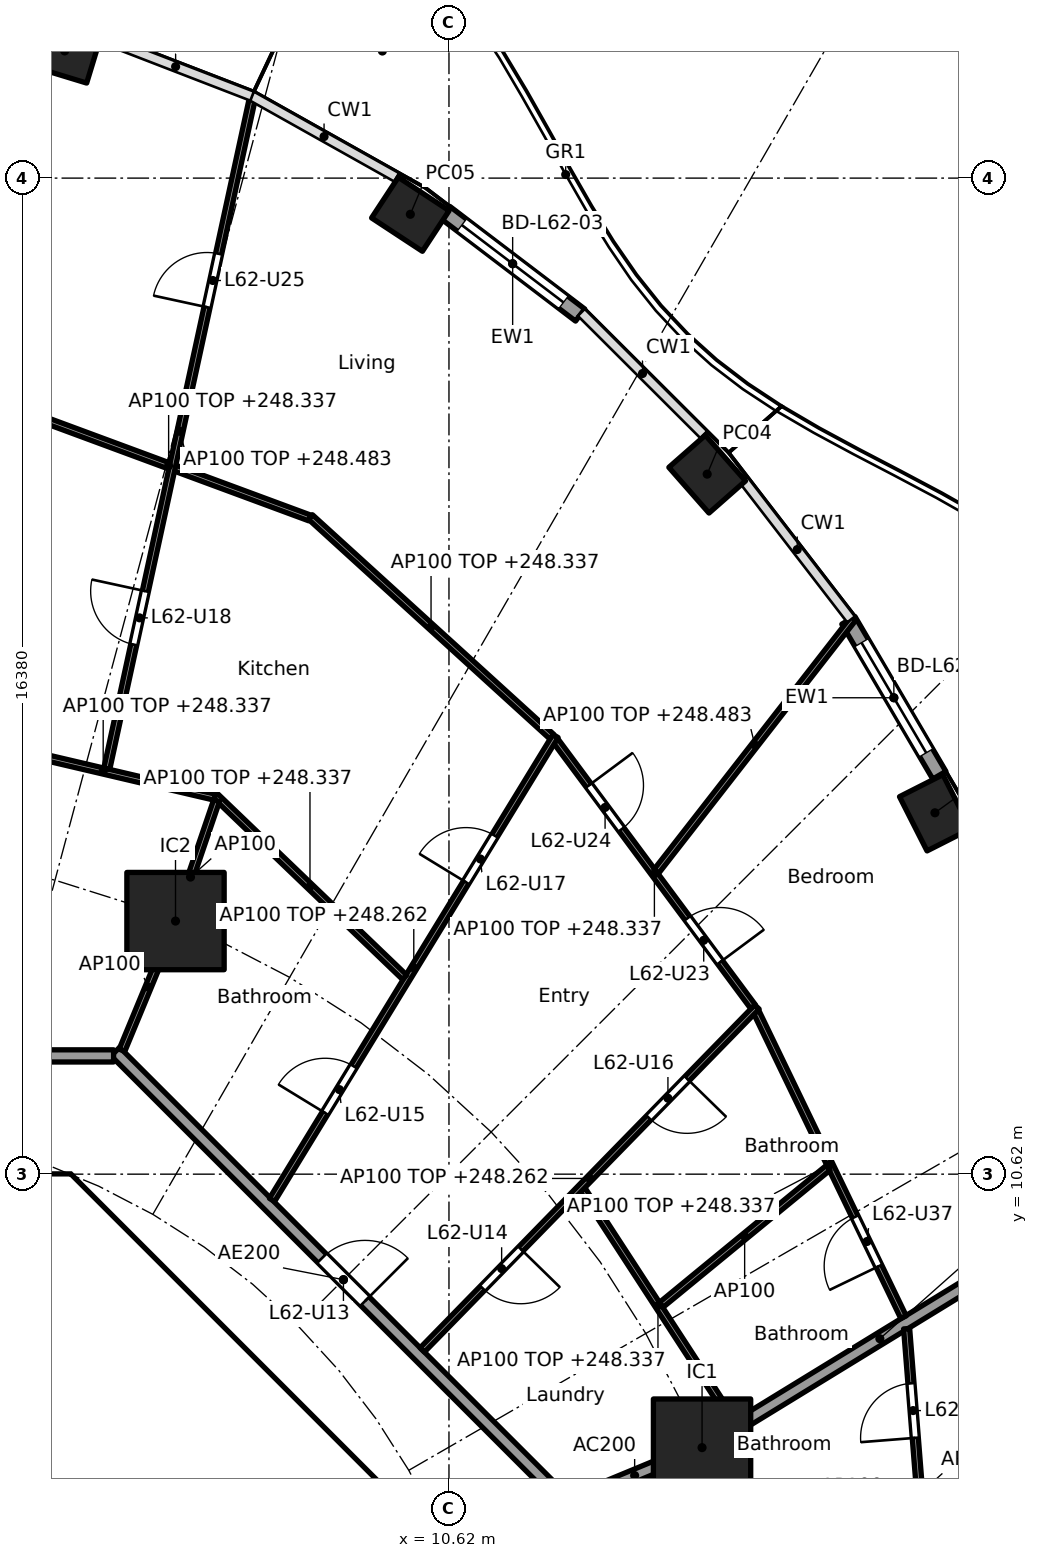
"""IFC4 building model, lengths in metres.
Left out: names, types, materials, properties, quantities, classifications, styles, units other than length and angle.
Written with IfcOpenShell. Run it as: python <this file> out.ifc"""

import sys

from ifc_helpers import new_model, si_unit, direction, frame, frame_2d, origin, origin_2d, place, context, subcontext, project, spatial, polyline, rectangle, hollow_rectangle, outline, extrude, element, fill, save


model = new_model("IFC4")
c1 = context("Model", 3, precision=1e-05, world=origin(), true_north=direction((0.0, 1.0)))
c2 = subcontext(c1, "Body", "Model", "MODEL_VIEW")
j1 = project(units=[si_unit("LENGTHUNIT", "METRE"), si_unit("PLANEANGLEUNIT", "RADIAN")], contexts=[c1])
p1 = place(None, origin())
s1 = spatial("IfcSite", under=j1, at=p1, CompositionType="ELEMENT")
p2 = place(p1, origin())
s2 = spatial("IfcBuilding", under=s1, at=p2, CompositionType="ELEMENT")
p3 = place(p2, frame((0.0, 0.0, 245.5)))
s3 = spatial("IfcBuildingStorey", under=s2, at=p3, CompositionType="ELEMENT", Elevation=245.5)
for number, where, z_axis, x_axis in (
    (1, (18.612, 16.563, 0.0), (0.0, 0.0, 1.0), (-0.452, 0.892, 0.0)),
    (2, (14.866, 22.132, 0.0), (0.0, 0.0, 1.0), (-0.66, 0.751, 0.0)),
    (3, (9.985, 26.405, 0.0), (0.0, 0.0, 1.0), (-0.836, 0.549, 0.0)),
    (4, (4.3, 29.092, 0.0), (0.0, 0.0, 1.0), (-0.957, 0.292, 0.0)),
):
    element("IfcColumn", number, at=place(p3, frame(where, z_axis=z_axis, x_axis=x_axis)), inside=s3, PredefinedType="COLUMN", context=c2, shape_type="SweptSolid", body=[
        extrude(hollow_rectangle(XDim=1.0, YDim=0.8, WallThickness=0.032, at=origin_2d()), origin(), (0.0, 0.0, 1.0), 3.7),
    ])
for number, where, z_axis, x_axis in (
    (5, (14.782, 6.123, 0.0), (0.0, 0.0, 1.0), (1.0, 0.0, 0.0)),
    (6, (6.123, 14.782, 0.0), (0.0, 0.0, 1.0), (1.0, 0.0, 0.0)),
):
    element("IfcColumn", number, at=place(p3, frame(where, z_axis=z_axis, x_axis=x_axis)), inside=s3, PredefinedType="COLUMN", context=c2, shape_type="SweptSolid", body=[
        extrude(rectangle(XDim=1.6, YDim=1.6, at=origin_2d()), origin(), (0.0, 0.0, 1.0), 3.7),
    ])
p4 = place(p3, frame((17.188, 19.728, 0.0), z_axis=(0.0, 0.0, 1.0), x_axis=(0.506391620556, -0.862303616269, 0.0)))
e7 = element("IfcWall", 7, at=p4, inside=s3, PredefinedType="SOLIDWALL", context=c2, shape_type="SweptSolid", body=[
    extrude(rectangle(XDim=2.954, YDim=0.25, at=frame_2d((1.477, 0.0))), origin(), (0.0, 0.0, 1.0), 3.44),
])
p5 = place(p4, frame((0.427, 0.0, 0.0)))
e8 = element("IfcOpeningElement", 8, at=p5, cuts=e7, PredefinedType="OPENING", context=c2, shape_type="SweptSolid", body=[
    extrude(rectangle(XDim=2.1, YDim=2.4, at=frame_2d((1.05, 1.2))), frame((0.0, 0.135, 0.0), z_axis=(0.0, -1.0, 0.0), x_axis=(1.0, 0.0, 0.0)), (0.0, 0.0, 1.0), 0.27),
])
p6 = place(p3, frame((10.557, 26.436, 0.0), z_axis=(0.0, 0.0, 1.0), x_axis=(0.796022158395, -0.605267480825, 0.0)))
e9 = element("IfcWall", 9, at=p6, inside=s3, PredefinedType="SOLIDWALL", context=c2, shape_type="SweptSolid", body=[
    extrude(rectangle(XDim=2.789, YDim=0.25, at=frame_2d((1.395, 0.0))), origin(), (0.0, 0.0, 1.0), 3.44),
])
p7 = place(p6, frame((0.344, 0.0, 0.0)))
e10 = element("IfcOpeningElement", 10, at=p7, cuts=e9, PredefinedType="OPENING", context=c2, shape_type="SweptSolid", body=[
    extrude(rectangle(XDim=2.1, YDim=2.4, at=frame_2d((1.05, 1.2))), frame((0.0, 0.135, 0.0), z_axis=(0.0, -1.0, 0.0), x_axis=(1.0, 0.0, 0.0)), (0.0, 0.0, 1.0), 0.27),
])
p8 = place(p3, frame((9.988, 4.613, 0.0), z_axis=(0.0, 0.0, 1.0), x_axis=(-0.707106781187, 0.707106781187, 0.0)))
e11 = element("IfcWall", 11, at=p8, inside=s3, PredefinedType="SHEAR", context=c2, shape_type="SweptSolid", body=[
    extrude(rectangle(XDim=7.602, YDim=0.6, at=frame_2d((3.801, 0.0))), origin(), (0.0, 0.0, 1.0), 3.44),
])
p9 = place(p8, frame((3.201, 0.0, 0.0)))
e12 = element("IfcOpeningElement", 12, at=p9, cuts=e11, PredefinedType="OPENING", context=c2, shape_type="SweptSolid", body=[
    extrude(rectangle(XDim=1.2, YDim=2.1, at=frame_2d((0.6, 1.05))), frame((0.0, 0.31, 0.0), z_axis=(0.0, -1.0, 0.0), x_axis=(1.0, 0.0, 0.0)), (0.0, 0.0, 1.0), 0.62),
])
p10 = place(p3, origin())
e13 = element("IfcWall", 13, at=p10, inside=s3, PredefinedType="SHEAR", context=c2, shape_type="SweptSolid", body=[
    extrude(outline(polyline([(-4.152, 10.025), (-4.401, 9.776), (-4.825, 10.2), (-4.401, 10.625), (4.401, 10.625), (4.825, 10.2), (4.401, 9.776), (4.152, 10.025), (-4.152, 10.025)])), origin(), (0.0, 0.0, 1.0), 3.44),
])
p11 = place(p3, frame((12.657, 5.243, 0.0), z_axis=(0.0, 0.0, 1.0), x_axis=(0.92383017907, 0.382802560388, 0.0)))
e14 = element("IfcWall", 14, at=p11, inside=s3, PredefinedType="PARTITIONING", context=c2, shape_type="SweptSolid", body=[
    extrude(rectangle(XDim=2.2, YDim=0.2, at=frame_2d((1.1, 0.0))), origin(), (0.0, 0.0, 1.0), 3.44),
])
p12 = place(p3, frame((14.825, 6.149, 0.0), z_axis=(0.0, 0.0, 1.0), x_axis=(0.852781365284, 0.522268075824, 0.0)))
e15 = element("IfcWall", 15, at=p12, inside=s3, PredefinedType="PARTITIONING", context=c2, shape_type="SweptSolid", body=[
    extrude(rectangle(XDim=6.758, YDim=0.2, at=frame_2d((3.379, 0.0))), origin(), (0.0, 0.0, 1.0), 2.837),
])
p13 = place(p3, frame((12.635, 5.134, 0.0), z_axis=(0.0, 0.0, 1.0), x_axis=(-0.707106781187, 0.707106781187, 0.0)))
e16 = element("IfcWall", 16, at=p13, inside=s3, PredefinedType="PARTITIONING", context=c2, shape_type="SweptSolid", body=[
    extrude(rectangle(XDim=10.609, YDim=0.2, at=frame_2d((5.305, 0.0))), origin(), (0.0, 0.0, 1.0), 3.44),
])
p14 = place(p13, frame((4.804, 0.0, 0.0)))
e17 = element("IfcOpeningElement", 17, at=p14, cuts=e16, PredefinedType="OPENING", context=c2, shape_type="SweptSolid", body=[
    extrude(rectangle(XDim=1.0, YDim=2.1, at=frame_2d((0.5, 1.05))), frame((0.0, 0.11, 0.0), z_axis=(0.0, -1.0, 0.0), x_axis=(1.0, 0.0, 0.0)), (0.0, 0.0, 1.0), 0.22),
])
p15 = place(p3, frame((5.104, 12.565, 0.0), z_axis=(0.0, 0.0, 1.0), x_axis=(-1.0, 0.0, 0.0)))
e18 = element("IfcWall", 18, at=p15, inside=s3, PredefinedType="PARTITIONING", context=c2, shape_type="SweptSolid", body=[
    extrude(rectangle(XDim=10.409, YDim=0.2, at=frame_2d((5.205, 0.0))), origin(), (0.0, 0.0, 1.0), 3.44),
])
p16 = place(p3, frame((15.475, 2.2, 0.0), z_axis=(0.0, 0.0, 1.0), x_axis=(-0.029254623973, 0.999571991893, 0.0)))
e19 = element("IfcWall", 19, at=p16, inside=s3, PredefinedType="PARTITIONING", context=c2, shape_type="SweptSolid", body=[
    extrude(rectangle(XDim=4.173, YDim=0.1, at=frame_2d((2.086, 0.0))), origin(), (0.0, 0.0, 1.0), 2.837),
])
p17 = place(p3, frame((18.578, 2.642, 0.0), z_axis=(0.0, 0.0, 1.0), x_axis=(-0.079188322924, 0.996859673932, 0.0)))
e20 = element("IfcWall", 20, at=p17, inside=s3, PredefinedType="PARTITIONING", context=c2, shape_type="SweptSolid", body=[
    extrude(rectangle(XDim=5.454, YDim=0.1, at=frame_2d((2.727, 0.0))), origin(), (0.0, 0.0, 1.0), 2.837),
])
p18 = place(p17, frame((3.653, 0.0, 0.0)))
e21 = element("IfcOpeningElement", 21, at=p18, cuts=e20, PredefinedType="OPENING", context=c2, shape_type="SweptSolid", body=[
    extrude(rectangle(XDim=0.9, YDim=2.1, at=frame_2d((0.45, 1.05))), frame((0.0, 0.06, 0.0), z_axis=(0.0, -1.0, 0.0), x_axis=(1.0, 0.0, 0.0)), (0.0, 0.0, 1.0), 0.12),
])
p19 = place(p3, frame((15.295, 6.554, 0.0), z_axis=(0.0, 0.0, 1.0), x_axis=(-0.545150807833, 0.838337996705, 0.0)))
e22 = element("IfcWall", 22, at=p19, inside=s3, PredefinedType="PARTITIONING", context=c2, shape_type="SweptSolid", body=[
    extrude(rectangle(XDim=4.542, YDim=0.1, at=frame_2d((2.271, 0.0))), origin(), (0.0, 0.0, 1.0), 2.837),
])
p20 = place(p3, frame((18.095, 8.269, 0.0), z_axis=(0.0, 0.0, 1.0), x_axis=(-0.434643729881, 0.900602480607, 0.0)))
e23 = element("IfcWall", 23, at=p20, inside=s3, PredefinedType="PARTITIONING", context=c2, shape_type="SweptSolid", body=[
    extrude(rectangle(XDim=5.574, YDim=0.1, at=frame_2d((2.787, 0.0))), origin(), (0.0, 0.0, 1.0), 2.837),
])
p21 = place(p20, frame((0.931, 0.0, 0.0)))
e24 = element("IfcOpeningElement", 24, at=p21, cuts=e23, PredefinedType="OPENING", context=c2, shape_type="SweptSolid", body=[
    extrude(rectangle(XDim=0.9, YDim=2.1, at=frame_2d((0.45, 1.05))), frame((0.0, 0.06, 0.0), z_axis=(0.0, -1.0, 0.0), x_axis=(1.0, 0.0, 0.0)), (0.0, 0.0, 1.0), 0.12),
])
p22 = place(p3, frame((14.109, 8.469, 0.0), z_axis=(0.0, 0.0, 1.0), x_axis=(0.772802064515, 0.634647121699, 0.0)))
e25 = element("IfcWall", 25, at=p22, inside=s3, PredefinedType="PARTITIONING", context=c2, shape_type="SweptSolid", body=[
    extrude(rectangle(XDim=3.554, YDim=0.1, at=frame_2d((1.777, 0.0))), origin(), (0.0, 0.0, 1.0), 3.44),
])
p23 = place(p3, frame((10.181, 7.729, 0.0), z_axis=(0.0, 0.0, 1.0), x_axis=(0.698426432281, 0.715681855779, 0.0)))
e26 = element("IfcWall", 26, at=p23, inside=s3, PredefinedType="PARTITIONING", context=c2, shape_type="SweptSolid", body=[
    extrude(rectangle(XDim=7.881, YDim=0.1, at=frame_2d((3.94, 0.0))), origin(), (0.0, 0.0, 1.0), 2.762),
])
p24 = place(p23, frame((1.419, 0.0, 0.0)))
e27 = element("IfcOpeningElement", 27, at=p24, cuts=e26, PredefinedType="OPENING", context=c2, shape_type="SweptSolid", body=[
    extrude(rectangle(XDim=0.9, YDim=2.1, at=frame_2d((0.45, 1.05))), frame((0.0, 0.06, 0.0), z_axis=(0.0, -1.0, 0.0), x_axis=(1.0, 0.0, 0.0)), (0.0, 0.0, 1.0), 0.12),
])
p25 = place(p23, frame((5.334, 0.0, 0.0)))
e28 = element("IfcOpeningElement", 28, at=p25, cuts=e26, PredefinedType="OPENING", context=c2, shape_type="SweptSolid", body=[
    extrude(rectangle(XDim=0.9, YDim=2.1, at=frame_2d((0.45, 1.05))), frame((0.0, 0.06, 0.0), z_axis=(0.0, -1.0, 0.0), x_axis=(1.0, 0.0, 0.0)), (0.0, 0.0, 1.0), 0.12),
])
p26 = place(p3, frame((15.621, 13.374, 0.0), z_axis=(0.0, 0.0, 1.0), x_axis=(-0.596174489482, 0.8028548923, 0.0)))
e29 = element("IfcWall", 29, at=p26, inside=s3, PredefinedType="PARTITIONING", context=c2, shape_type="SweptSolid", body=[
    extrude(rectangle(XDim=5.442, YDim=0.1, at=frame_2d((2.721, 0.0))), origin(), (0.0, 0.0, 1.0), 2.837),
])
p27 = place(p26, frame((0.91, 0.0, 0.0)))
e30 = element("IfcOpeningElement", 30, at=p27, cuts=e29, PredefinedType="OPENING", context=c2, shape_type="SweptSolid", body=[
    extrude(rectangle(XDim=0.9, YDim=2.1, at=frame_2d((0.45, 1.05))), frame((0.0, 0.06, 0.0), z_axis=(0.0, -1.0, 0.0), x_axis=(1.0, 0.0, 0.0)), (0.0, 0.0, 1.0), 0.12),
])
p28 = place(p26, frame((3.631, 0.0, 0.0)))
e31 = element("IfcOpeningElement", 31, at=p28, cuts=e29, PredefinedType="OPENING", context=c2, shape_type="SweptSolid", body=[
    extrude(rectangle(XDim=0.9, YDim=2.1, at=frame_2d((0.45, 1.05))), frame((0.0, 0.06, 0.0), z_axis=(0.0, -1.0, 0.0), x_axis=(1.0, 0.0, 0.0)), (0.0, 0.0, 1.0), 0.12),
])
p29 = place(p3, frame((14.029, 15.598, 0.0), z_axis=(0.0, 0.0, 1.0), x_axis=(0.614558710688, 0.788871086501, 0.0)))
e32 = element("IfcWall", 32, at=p29, inside=s3, PredefinedType="PARTITIONING", context=c2, shape_type="SweptSolid", body=[
    extrude(rectangle(XDim=5.276, YDim=0.1, at=frame_2d((2.638, 0.0))), origin(), (0.0, 0.0, 1.0), 2.983),
])
p30 = place(p3, frame((7.71, 10.197, 0.0), z_axis=(0.0, 0.0, 1.0), x_axis=(0.521477621335, 0.853264959111, 0.0)))
e33 = element("IfcWall", 33, at=p30, inside=s3, PredefinedType="PARTITIONING", context=c2, shape_type="SweptSolid", body=[
    extrude(rectangle(XDim=8.941, YDim=0.1, at=frame_2d((4.471, 0.0))), origin(), (0.0, 0.0, 1.0), 2.762),
])
p31 = place(p30, frame((1.675, 0.0, 0.0)))
e34 = element("IfcOpeningElement", 34, at=p31, cuts=e33, PredefinedType="OPENING", context=c2, shape_type="SweptSolid", body=[
    extrude(rectangle(XDim=0.9, YDim=2.1, at=frame_2d((0.45, 1.05))), frame((0.0, 0.06, 0.0), z_axis=(0.0, -1.0, 0.0), x_axis=(1.0, 0.0, 0.0)), (0.0, 0.0, 1.0), 0.12),
])
p32 = place(p30, frame((6.121, 0.0, 0.0)))
e35 = element("IfcOpeningElement", 35, at=p32, cuts=e33, PredefinedType="OPENING", context=c2, shape_type="SweptSolid", body=[
    extrude(rectangle(XDim=0.9, YDim=2.1, at=frame_2d((0.45, 1.05))), frame((0.0, 0.06, 0.0), z_axis=(0.0, -1.0, 0.0), x_axis=(1.0, 0.0, 0.0)), (0.0, 0.0, 1.0), 0.12),
])
p33 = place(p3, frame((9.89, 13.858, 0.0), z_axis=(0.0, 0.0, 1.0), x_axis=(-0.72167233993, 0.692234811159, 0.0)))
e36 = element("IfcWall", 36, at=p33, inside=s3, PredefinedType="PARTITIONING", context=c2, shape_type="SweptSolid", body=[
    extrude(rectangle(XDim=4.313, YDim=0.1, at=frame_2d((2.156, 0.0))), origin(), (0.0, 0.0, 1.0), 2.837),
])
p34 = place(p3, frame((12.31, 17.817, 0.0), z_axis=(0.0, 0.0, 1.0), x_axis=(-0.739697052892, 0.672940019573, 0.0)))
e37 = element("IfcWall", 37, at=p34, inside=s3, PredefinedType="PARTITIONING", context=c2, shape_type="SweptSolid", body=[
    extrude(rectangle(XDim=5.365, YDim=0.1, at=frame_2d((2.683, 0.0))), origin(), (0.0, 0.0, 1.0), 2.837),
])
p35 = place(p3, frame((5.243, 12.657, 0.0), z_axis=(0.0, 0.0, 1.0), x_axis=(0.382719158442, 0.923864733477, 0.0)))
e38 = element("IfcWall", 38, at=p35, inside=s3, PredefinedType="PARTITIONING", context=c2, shape_type="SweptSolid", body=[
    extrude(rectangle(XDim=2.25, YDim=0.1, at=frame_2d((1.125, 0.0))), origin(), (0.0, 0.0, 1.0), 3.44),
])
p36 = place(p3, frame((6.139, 14.829, 0.0), z_axis=(0.0, 0.0, 1.0), x_axis=(0.32278593828, 0.946471995385, 0.0)))
e39 = element("IfcWall", 39, at=p36, inside=s3, PredefinedType="PARTITIONING", context=c2, shape_type="SweptSolid", body=[
    extrude(rectangle(XDim=2.042, YDim=0.1, at=frame_2d((1.021, 0.0))), origin(), (0.0, 0.0, 1.0), 3.44),
])
p37 = place(p3, frame((6.766, 16.82, 0.0), z_axis=(0.0, 0.0, 1.0), x_axis=(-0.973620139133, 0.228174986961, 0.0)))
e40 = element("IfcWall", 40, at=p37, inside=s3, PredefinedType="PARTITIONING", context=c2, shape_type="SweptSolid", body=[
    extrude(rectangle(XDim=3.763, YDim=0.1, at=frame_2d((1.882, 0.0))), origin(), (0.0, 0.0, 1.0), 2.837),
])
p38 = place(p3, frame((8.331, 21.411, 0.0), z_axis=(0.0, 0.0, 1.0), x_axis=(-0.937892657706, 0.346925586575, 0.0)))
e41 = element("IfcWall", 41, at=p38, inside=s3, PredefinedType="PARTITIONING", context=c2, shape_type="SweptSolid", body=[
    extrude(rectangle(XDim=4.95, YDim=0.1, at=frame_2d((2.475, 0.0))), origin(), (0.0, 0.0, 1.0), 2.837),
])
p39 = place(p3, frame((4.993, 17.287, 0.0), z_axis=(0.0, 0.0, 1.0), x_axis=(0.21221094606, 0.977223881397, 0.0)))
e42 = element("IfcWall", 42, at=p39, inside=s3, PredefinedType="PARTITIONING", context=c2, shape_type="SweptSolid", body=[
    extrude(rectangle(XDim=11.355, YDim=0.1, at=frame_2d((5.677, 0.0))), origin(), (0.0, 0.0, 1.0), 2.983),
])
p40 = place(p39, frame((2.089, 0.0, 0.0)))
e43 = element("IfcOpeningElement", 43, at=p40, cuts=e42, PredefinedType="OPENING", context=c2, shape_type="SweptSolid", body=[
    extrude(rectangle(XDim=0.9, YDim=2.1, at=frame_2d((0.45, 1.05))), frame((0.0, 0.06, 0.0), z_axis=(0.0, -1.0, 0.0), x_axis=(1.0, 0.0, 0.0)), (0.0, 0.0, 1.0), 0.12),
])
p41 = place(p39, frame((7.767, 0.0, 0.0)))
e44 = element("IfcOpeningElement", 44, at=p41, cuts=e42, PredefinedType="OPENING", context=c2, shape_type="SweptSolid", body=[
    extrude(rectangle(XDim=0.9, YDim=2.1, at=frame_2d((0.45, 1.05))), frame((0.0, 0.06, 0.0), z_axis=(0.0, -1.0, 0.0), x_axis=(1.0, 0.0, 0.0)), (0.0, 0.0, 1.0), 0.12),
])
p42 = place(p5, origin())
e45 = element("IfcDoor", 45, at=p42, inside=s3, OperationType="SLIDING_TO_LEFT", PredefinedType="DOOR", context=c2, shape_type="SweptSolid", body=[
    extrude(rectangle(XDim=2.1, YDim=2.4, at=frame_2d((1.05, 1.2))), frame((0.0, 0.025, 0.0), z_axis=(0.0, -1.0, 0.0), x_axis=(1.0, 0.0, 0.0)), (0.0, 0.0, 1.0), 0.05),
])
fill(e8, e45)
p43 = place(p7, origin())
e46 = element("IfcDoor", 46, at=p43, inside=s3, OperationType="SLIDING_TO_LEFT", PredefinedType="DOOR", context=c2, shape_type="SweptSolid", body=[
    extrude(rectangle(XDim=2.1, YDim=2.4, at=frame_2d((1.05, 1.2))), frame((0.0, 0.025, 0.0), z_axis=(0.0, -1.0, 0.0), x_axis=(1.0, 0.0, 0.0)), (0.0, 0.0, 1.0), 0.05),
])
fill(e10, e46)
p44 = place(p9, origin())
e47 = element("IfcDoor", 47, at=p44, inside=s3, OperationType="SINGLE_SWING_RIGHT", PredefinedType="DOOR", context=c2, shape_type="SweptSolid", body=[
    extrude(rectangle(XDim=1.2, YDim=2.1, at=frame_2d((0.6, 1.05))), frame((0.0, 0.025, 0.0), z_axis=(0.0, -1.0, 0.0), x_axis=(1.0, 0.0, 0.0)), (0.0, 0.0, 1.0), 0.05),
])
fill(e12, e47)
p45 = place(p18, origin())
e48 = element("IfcDoor", 48, at=p45, inside=s3, OperationType="SINGLE_SWING_LEFT", PredefinedType="DOOR", context=c2, shape_type="SweptSolid", body=[
    extrude(rectangle(XDim=0.9, YDim=2.1, at=frame_2d((0.45, 1.05))), frame((0.0, 0.025, 0.0), z_axis=(0.0, -1.0, 0.0), x_axis=(1.0, 0.0, 0.0)), (0.0, 0.0, 1.0), 0.05),
])
fill(e21, e48)
p46 = place(p14, frame((1.0, 0.0, 0.0), x_axis=(-1.0, 0.0, 0.0)))
e49 = element("IfcDoor", 49, at=p46, inside=s3, OperationType="SINGLE_SWING_RIGHT", PredefinedType="DOOR", context=c2, shape_type="SweptSolid", body=[
    extrude(rectangle(XDim=1.0, YDim=2.1, at=frame_2d((0.5, 1.05))), frame((0.0, 0.025, 0.0), z_axis=(0.0, -1.0, 0.0), x_axis=(1.0, 0.0, 0.0)), (0.0, 0.0, 1.0), 0.05),
])
fill(e17, e49)
p47 = place(p24, frame((0.9, 0.0, 0.0), x_axis=(-1.0, 0.0, 0.0)))
e50 = element("IfcDoor", 50, at=p47, inside=s3, OperationType="SINGLE_SWING_LEFT", PredefinedType="DOOR", context=c2, shape_type="SweptSolid", body=[
    extrude(rectangle(XDim=0.9, YDim=2.1, at=frame_2d((0.45, 1.05))), frame((0.0, 0.025, 0.0), z_axis=(0.0, -1.0, 0.0), x_axis=(1.0, 0.0, 0.0)), (0.0, 0.0, 1.0), 0.05),
])
fill(e27, e50)
p48 = place(p31, origin())
e51 = element("IfcDoor", 51, at=p48, inside=s3, OperationType="SINGLE_SWING_LEFT", PredefinedType="DOOR", context=c2, shape_type="SweptSolid", body=[
    extrude(rectangle(XDim=0.9, YDim=2.1, at=frame_2d((0.45, 1.05))), frame((0.0, 0.025, 0.0), z_axis=(0.0, -1.0, 0.0), x_axis=(1.0, 0.0, 0.0)), (0.0, 0.0, 1.0), 0.05),
])
fill(e34, e51)
p49 = place(p25, frame((0.9, 0.0, 0.0), x_axis=(-1.0, 0.0, 0.0)))
e52 = element("IfcDoor", 52, at=p49, inside=s3, OperationType="SINGLE_SWING_LEFT", PredefinedType="DOOR", context=c2, shape_type="SweptSolid", body=[
    extrude(rectangle(XDim=0.9, YDim=2.1, at=frame_2d((0.45, 1.05))), frame((0.0, 0.025, 0.0), z_axis=(0.0, -1.0, 0.0), x_axis=(1.0, 0.0, 0.0)), (0.0, 0.0, 1.0), 0.05),
])
fill(e28, e52)
p50 = place(p32, origin())
e53 = element("IfcDoor", 53, at=p50, inside=s3, OperationType="SINGLE_SWING_LEFT", PredefinedType="DOOR", context=c2, shape_type="SweptSolid", body=[
    extrude(rectangle(XDim=0.9, YDim=2.1, at=frame_2d((0.45, 1.05))), frame((0.0, 0.025, 0.0), z_axis=(0.0, -1.0, 0.0), x_axis=(1.0, 0.0, 0.0)), (0.0, 0.0, 1.0), 0.05),
])
fill(e35, e53)
p51 = place(p40, origin())
e54 = element("IfcDoor", 54, at=p51, inside=s3, OperationType="SINGLE_SWING_RIGHT", PredefinedType="DOOR", context=c2, shape_type="SweptSolid", body=[
    extrude(rectangle(XDim=0.9, YDim=2.1, at=frame_2d((0.45, 1.05))), frame((0.0, 0.025, 0.0), z_axis=(0.0, -1.0, 0.0), x_axis=(1.0, 0.0, 0.0)), (0.0, 0.0, 1.0), 0.05),
])
fill(e43, e54)
p52 = place(p27, frame((0.9, 0.0, 0.0), x_axis=(-1.0, 0.0, 0.0)))
e55 = element("IfcDoor", 55, at=p52, inside=s3, OperationType="SINGLE_SWING_RIGHT", PredefinedType="DOOR", context=c2, shape_type="SweptSolid", body=[
    extrude(rectangle(XDim=0.9, YDim=2.1, at=frame_2d((0.45, 1.05))), frame((0.0, 0.025, 0.0), z_axis=(0.0, -1.0, 0.0), x_axis=(1.0, 0.0, 0.0)), (0.0, 0.0, 1.0), 0.05),
])
fill(e30, e55)
p53 = place(p28, frame((0.9, 0.0, 0.0), x_axis=(-1.0, 0.0, 0.0)))
e56 = element("IfcDoor", 56, at=p53, inside=s3, OperationType="SINGLE_SWING_LEFT", PredefinedType="DOOR", context=c2, shape_type="SweptSolid", body=[
    extrude(rectangle(XDim=0.9, YDim=2.1, at=frame_2d((0.45, 1.05))), frame((0.0, 0.025, 0.0), z_axis=(0.0, -1.0, 0.0), x_axis=(1.0, 0.0, 0.0)), (0.0, 0.0, 1.0), 0.05),
])
fill(e31, e56)
p54 = place(p41, origin())
e57 = element("IfcDoor", 57, at=p54, inside=s3, OperationType="SINGLE_SWING_LEFT", PredefinedType="DOOR", context=c2, shape_type="SweptSolid", body=[
    extrude(rectangle(XDim=0.9, YDim=2.1, at=frame_2d((0.45, 1.05))), frame((0.0, 0.025, 0.0), z_axis=(0.0, -1.0, 0.0), x_axis=(1.0, 0.0, 0.0)), (0.0, 0.0, 1.0), 0.05),
])
fill(e44, e57)
p55 = place(p21, origin())
e58 = element("IfcDoor", 58, at=p55, inside=s3, OperationType="SINGLE_SWING_LEFT", PredefinedType="DOOR", context=c2, shape_type="SweptSolid", body=[
    extrude(rectangle(XDim=0.9, YDim=2.1, at=frame_2d((0.45, 1.05))), frame((0.0, 0.025, 0.0), z_axis=(0.0, -1.0, 0.0), x_axis=(1.0, 0.0, 0.0)), (0.0, 0.0, 1.0), 0.05),
])
fill(e24, e58)
save(model, sys.argv[1])
